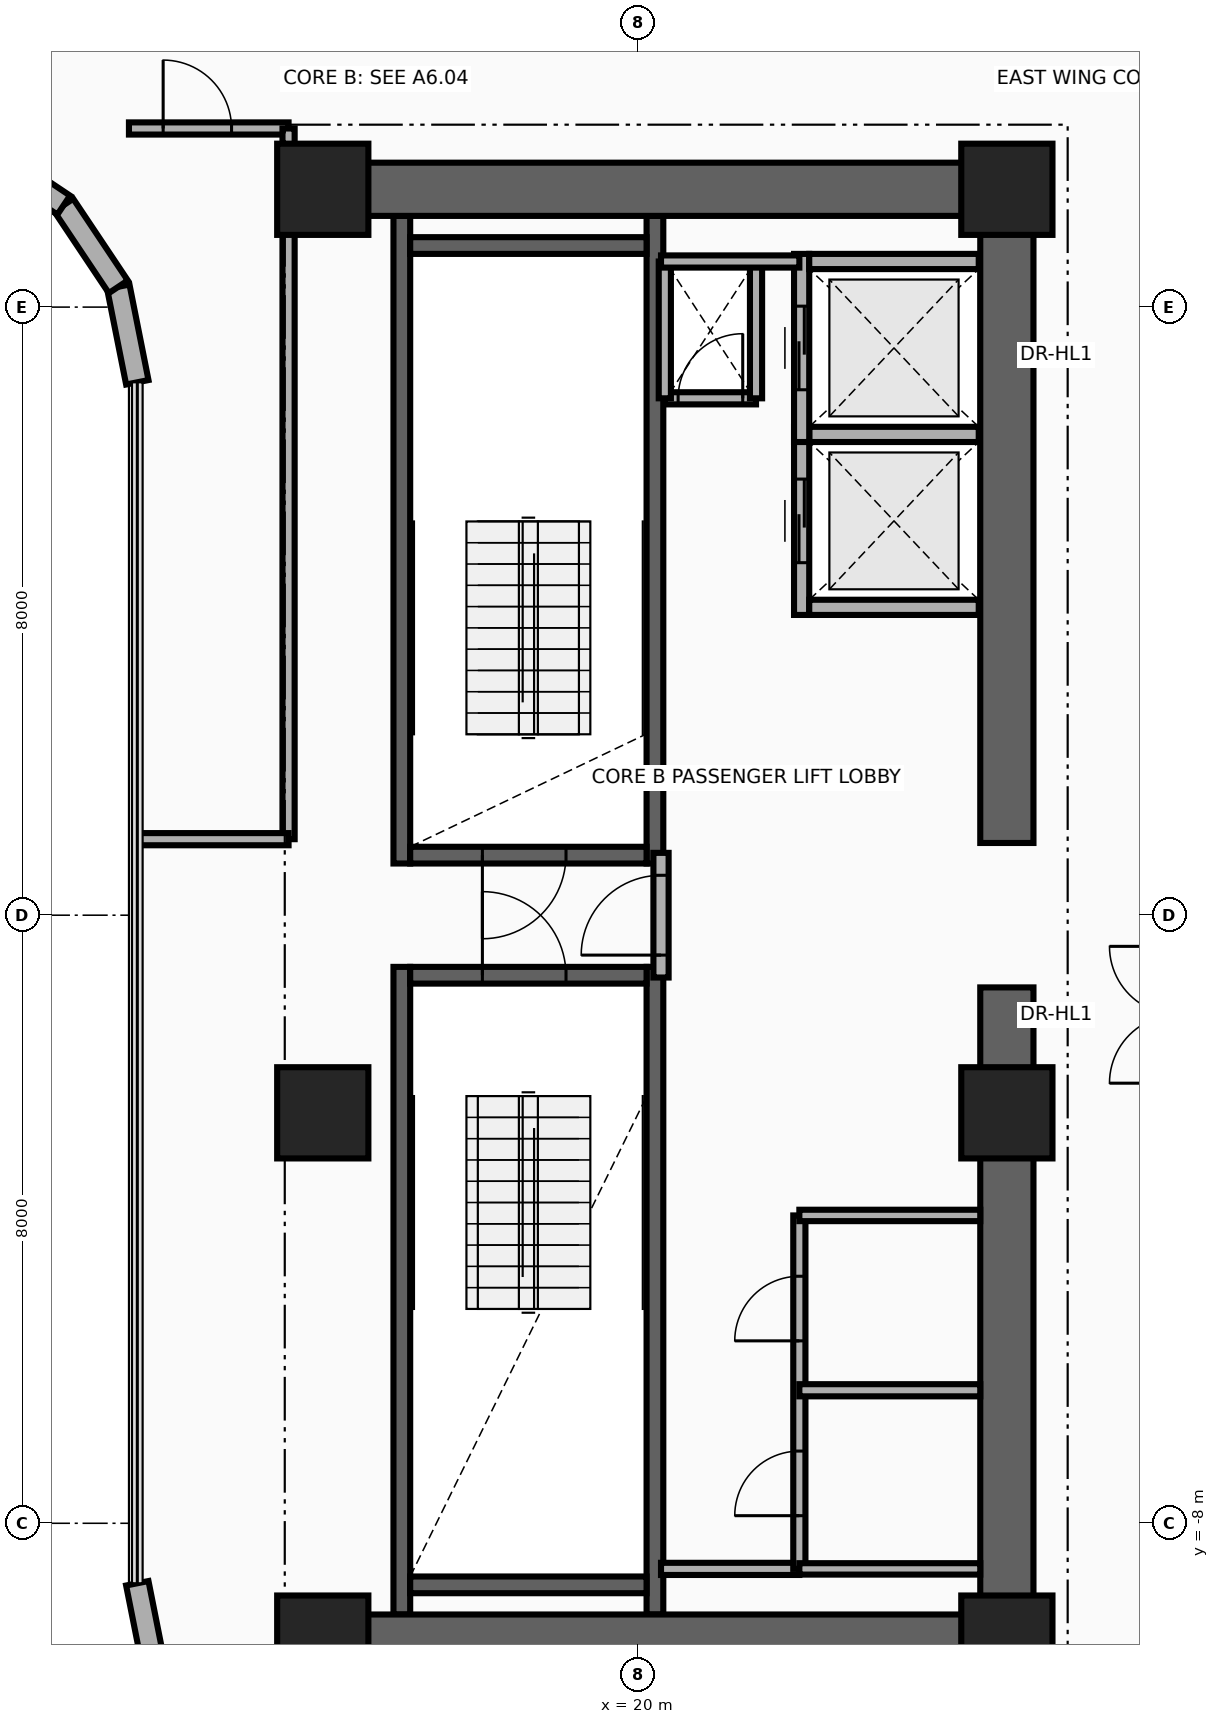
"""IFC4 building model, lengths in metres.
Left out: names, types, materials, properties, quantities, classifications, styles, units other than length and angle.
Written with IfcOpenShell. Run it as: python <this file> out.ifc"""

import sys

from ifc_helpers import new_model, si_unit, direction, frame, frame_2d, origin, origin_2d, place, context, subcontext, project, spatial, rectangle, extrude, source, transform, mapped, element, fill, save


model = new_model("IFC4")
c1 = context("Model", 3, precision=1e-05, world=origin(), true_north=direction((0.0, 1.0)))
c2 = subcontext(c1, "Body", "Model", "MODEL_VIEW")
j1 = project(units=[si_unit("LENGTHUNIT", "METRE"), si_unit("PLANEANGLEUNIT", "RADIAN")], contexts=[c1])
p1 = place(None, origin())
s1 = spatial("IfcSite", under=j1, at=p1, CompositionType="ELEMENT")
p2 = place(p1, origin())
s2 = spatial("IfcBuilding", under=s1, at=p2, CompositionType="ELEMENT")
p3 = place(p2, frame((0.0, 0.0, 109.4)))
s3 = spatial("IfcBuildingStorey", under=s2, at=p3, CompositionType="ELEMENT", Elevation=109.4)
for number, where, z_axis, x_axis in (
    (1, (16.89, 0.68, 0.0), (0.0, 0.0, 1.0), (0.0, 1.0, 0.0)),
    (2, (20.22, 0.68, 0.0), (0.0, 0.0, 1.0), (0.0, 1.0, 0.0)),
):
    element("IfcWall", number, at=place(p3, frame(where, z_axis=z_axis, x_axis=x_axis)), inside=s3, PredefinedType="SHEAR", context=c2, shape_type="SweptSolid", body=[
        extrude(rectangle(XDim=8.52, YDim=0.22, at=frame_2d((4.26, 0.0))), origin(), (0.0, 0.0, 1.0), 3.46),
    ])
p4 = place(p3, frame((17.0, 0.79, 0.0), z_axis=(0.0, 0.0, 1.0), x_axis=(1.0, 0.0, 0.0)))
e3 = element("IfcWall", 3, at=p4, inside=s3, PredefinedType="SHEAR", context=c2, shape_type="SweptSolid", body=[
    extrude(rectangle(XDim=3.11, YDim=0.22, at=frame_2d((1.555, 0.0))), origin(), (0.0, 0.0, 1.0), 3.46),
])
p5 = place(p4, frame((0.95, 0.0, 0.0)))
e4 = element("IfcOpeningElement", 4, at=p5, cuts=e3, PredefinedType="OPENING", context=c2, shape_type="SweptSolid", body=[
    extrude(rectangle(XDim=1.1, YDim=2.15, at=frame_2d((0.55, 1.075))), frame((0.0, 0.125, 0.0), z_axis=(0.0, -1.0, 0.0), x_axis=(1.0, 0.0, 0.0)), (0.0, 0.0, 1.0), 0.25),
])
p6 = place(p3, frame((17.0, 8.81, 0.0), z_axis=(0.0, 0.0, 1.0), x_axis=(1.0, 0.0, 0.0)))
e5 = element("IfcWall", 5, at=p6, inside=s3, PredefinedType="SHEAR", context=c2, shape_type="SweptSolid", body=[
    extrude(rectangle(XDim=3.11, YDim=0.22, at=frame_2d((1.555, 0.0))), origin(), (0.0, 0.0, 1.0), 3.46),
])
for number, where, z_axis, x_axis in (
    (6, (16.89, -9.2, 0.0), (0.0, 0.0, 1.0), (0.0, 1.0, 0.0)),
    (7, (20.22, -9.2, 0.0), (0.0, 0.0, 1.0), (0.0, 1.0, 0.0)),
):
    element("IfcWall", number, at=place(p3, frame(where, z_axis=z_axis, x_axis=x_axis)), inside=s3, PredefinedType="SHEAR", context=c2, shape_type="SweptSolid", body=[
        extrude(rectangle(XDim=8.52, YDim=0.22, at=frame_2d((4.26, 0.0))), origin(), (0.0, 0.0, 1.0), 3.46),
    ])
p7 = place(p3, frame((17.0, -8.81, 0.0), z_axis=(0.0, 0.0, 1.0), x_axis=(1.0, 0.0, 0.0)))
e8 = element("IfcWall", 8, at=p7, inside=s3, PredefinedType="SHEAR", context=c2, shape_type="SweptSolid", body=[
    extrude(rectangle(XDim=3.11, YDim=0.22, at=frame_2d((1.555, 0.0))), origin(), (0.0, 0.0, 1.0), 3.46),
])
p8 = place(p3, frame((17.0, -0.79, 0.0), z_axis=(0.0, 0.0, 1.0), x_axis=(1.0, 0.0, 0.0)))
e9 = element("IfcWall", 9, at=p8, inside=s3, PredefinedType="SHEAR", context=c2, shape_type="SweptSolid", body=[
    extrude(rectangle(XDim=3.11, YDim=0.22, at=frame_2d((1.555, 0.0))), origin(), (0.0, 0.0, 1.0), 3.46),
])
p9 = place(p8, frame((0.95, 0.0, 0.0)))
e10 = element("IfcOpeningElement", 10, at=p9, cuts=e9, PredefinedType="OPENING", context=c2, shape_type="SweptSolid", body=[
    extrude(rectangle(XDim=1.1, YDim=2.15, at=frame_2d((0.55, 1.075))), frame((0.0, 0.125, 0.0), z_axis=(0.0, -1.0, 0.0), x_axis=(1.0, 0.0, 0.0)), (0.0, 0.0, 1.0), 0.25),
])
for number, where, z_axis, x_axis in (
    (11, (24.85, -9.9, 0.0), (0.0, 0.0, 1.0), (0.0, 1.0, 0.0)),
    (12, (24.85, 0.95, 0.0), (0.0, 0.0, 1.0), (0.0, 1.0, 0.0)),
):
    element("IfcWall", number, at=place(p3, frame(where, z_axis=z_axis, x_axis=x_axis)), inside=s3, PredefinedType="SHEAR", context=c2, shape_type="SweptSolid", body=[
        extrude(rectangle(XDim=8.95, YDim=0.7, at=frame_2d((4.475, 0.0))), origin(), (0.0, 0.0, 1.0), 3.46),
    ])
for number, where, z_axis, x_axis in (
    (13, (15.85, 9.55, 0.0), (0.0, 0.0, 1.0), (1.0, 0.0, 0.0)),
    (14, (15.85, -9.55, 0.0), (0.0, 0.0, 1.0), (1.0, 0.0, 0.0)),
):
    element("IfcWall", number, at=place(p3, frame(where, z_axis=z_axis, x_axis=x_axis)), inside=s3, PredefinedType="SHEAR", context=c2, shape_type="SweptSolid", body=[
        extrude(rectangle(XDim=9.0, YDim=0.7, at=frame_2d((4.5, 0.0))), origin(), (0.0, 0.0, 1.0), 3.46),
    ])
m1 = source(origin(), c2, "Body", "SweptSolid", [
    extrude(rectangle(XDim=1.2, YDim=1.2, at=origin_2d()), origin(), (0.0, 0.0, 1.0), 3.7),
])
for number, where, z_axis, x_axis in (
    (15, (15.85, -9.55, 0.0), (0.0, 0.0, 1.0), (1.0, 0.0, 0.0)),
    (16, (24.85, -9.55, 0.0), (0.0, 0.0, 1.0), (1.0, 0.0, 0.0)),
    (17, (15.85, -2.6, 0.0), (0.0, 0.0, 1.0), (1.0, 0.0, 0.0)),
    (18, (24.85, -2.6, 0.0), (0.0, 0.0, 1.0), (1.0, 0.0, 0.0)),
    (19, (15.85, 9.55, 0.0), (0.0, 0.0, 1.0), (1.0, 0.0, 0.0)),
    (20, (24.85, 9.55, 0.0), (0.0, 0.0, 1.0), (1.0, 0.0, 0.0)),
):
    element("IfcColumn", number, at=place(p3, frame(where, z_axis=z_axis, x_axis=x_axis)), inside=s3, PredefinedType="COLUMN", context=c2, shape_type="MappedRepresentation", body=[
        mapped(m1, transform((0.0, 0.0, 0.0), x_axis=(1.0, 0.0, 0.0), y_axis=(0.0, 1.0, 0.0), z_axis=(0.0, 0.0, 1.0), scale=1.0)),
    ])
p10 = place(p3, frame((13.647, -9.982, 0.0), z_axis=(0.0, 0.0, 1.0), x_axis=(-0.195189223115, 0.980765602568, 0.0)))
e21 = element("IfcWall", 21, at=p10, inside=s3, PredefinedType="SOLIDWALL", context=c2, shape_type="SweptSolid", body=[
    extrude(rectangle(XDim=1.216, YDim=0.3, at=frame_2d((0.608, 0.0))), origin(), (0.0, 0.0, 1.0), 3.46),
])
p11 = place(p3, frame((13.41, 7.011, 0.0), z_axis=(0.0, 0.0, 1.0), x_axis=(-0.195090163074, 0.980785312019, 0.0)))
e22 = element("IfcWall", 22, at=p11, inside=s3, PredefinedType="SOLIDWALL", context=c2, shape_type="SweptSolid", body=[
    extrude(rectangle(XDim=1.281, YDim=0.3, at=frame_2d((0.641, 0.0))), origin(), (0.0, 0.0, 1.0), 3.46),
])
for number, where, z_axis, x_axis in (
    (23, (13.16, 8.268, 0.0), (0.0, 0.0, 1.0), (-0.556, 0.831, 0.0)),
    (24, (12.442, 9.342, 0.0), (0.0, 0.0, 1.0), (-0.831, 0.556, 0.0)),
):
    element("IfcWall", number, at=place(p3, frame(where, z_axis=z_axis, x_axis=x_axis)), inside=s3, PredefinedType="SOLIDWALL", context=c2, shape_type="SweptSolid", body=[
        extrude(rectangle(XDim=1.292, YDim=0.3, at=frame_2d((0.646, 0.0))), origin(), (0.0, 0.0, 1.0), 3.46),
    ])
p12 = place(p3, frame((22.15, 3.95, 0.0), z_axis=(0.0, 0.0, 1.0), x_axis=(0.0, 1.0, 0.0)))
e25 = element("IfcWall", 25, at=p12, inside=s3, PredefinedType="MOVABLE", context=c2, shape_type="SweptSolid", body=[
    extrude(rectangle(XDim=2.475, YDim=0.2, at=frame_2d((1.238, 0.0))), origin(), (0.0, 0.0, 1.0), 3.46),
])
p13 = place(p12, frame((0.688, 0.0, 0.0)))
e26 = element("IfcOpeningElement", 26, at=p13, cuts=e25, PredefinedType="OPENING", context=c2, shape_type="SweptSolid", body=[
    extrude(rectangle(XDim=1.1, YDim=2.1, at=frame_2d((0.55, 1.05))), frame((0.0, 0.115, 0.0), z_axis=(0.0, -1.0, 0.0), x_axis=(1.0, 0.0, 0.0)), (0.0, 0.0, 1.0), 0.23),
])
for number, where, z_axis, x_axis in (
    (27, (22.25, 4.05, 0.0), (0.0, 0.0, 1.0), (1.0, 0.0, 0.0)),
    (28, (22.25, 6.325, 0.0), (0.0, 0.0, 1.0), (1.0, 0.0, 0.0)),
):
    element("IfcWall", number, at=place(p3, frame(where, z_axis=z_axis, x_axis=x_axis)), inside=s3, PredefinedType="MOVABLE", context=c2, shape_type="SweptSolid", body=[
        extrude(rectangle(XDim=2.23, YDim=0.2, at=frame_2d((1.115, 0.0))), origin(), (0.0, 0.0, 1.0), 2.245),
    ])
p14 = place(p3, frame((22.15, 6.225, 0.0), z_axis=(0.0, 0.0, 1.0), x_axis=(0.0, 1.0, 0.0)))
e29 = element("IfcWall", 29, at=p14, inside=s3, PredefinedType="MOVABLE", context=c2, shape_type="SweptSolid", body=[
    extrude(rectangle(XDim=2.475, YDim=0.2, at=frame_2d((1.237, 0.0))), origin(), (0.0, 0.0, 1.0), 3.46),
])
p15 = place(p14, frame((0.688, 0.0, 0.0)))
e30 = element("IfcOpeningElement", 30, at=p15, cuts=e29, PredefinedType="OPENING", context=c2, shape_type="SweptSolid", body=[
    extrude(rectangle(XDim=1.1, YDim=2.1, at=frame_2d((0.55, 1.05))), frame((0.0, 0.115, 0.0), z_axis=(0.0, -1.0, 0.0), x_axis=(1.0, 0.0, 0.0)), (0.0, 0.0, 1.0), 0.23),
])
p16 = place(p3, frame((22.25, 8.6, 0.0), z_axis=(0.0, 0.0, 1.0), x_axis=(1.0, 0.0, 0.0)))
e31 = element("IfcWall", 31, at=p16, inside=s3, PredefinedType="MOVABLE", context=c2, shape_type="SweptSolid", body=[
    extrude(rectangle(XDim=2.23, YDim=0.2, at=frame_2d((1.115, 0.0))), origin(), (0.0, 0.0, 1.0), 2.245),
])
p17 = place(p3, frame((20.3, -0.82, 0.0), z_axis=(0.0, 0.0, 1.0), x_axis=(0.0, 1.0, 0.0)))
e32 = element("IfcWall", 32, at=p17, inside=s3, PredefinedType="PARTITIONING", context=c2, shape_type="SweptSolid", body=[
    extrude(rectangle(XDim=1.64, YDim=0.2, at=frame_2d((0.82, 0.0))), origin(), (0.0, 0.0, 1.0), 3.46),
])
p18 = place(p17, frame((0.295, 0.0, 0.0)))
e33 = element("IfcOpeningElement", 33, at=p18, cuts=e32, PredefinedType="OPENING", context=c2, shape_type="SweptSolid", body=[
    extrude(rectangle(XDim=1.05, YDim=2.15, at=frame_2d((0.525, 1.075))), frame((0.0, 0.115, 0.0), z_axis=(0.0, -1.0, 0.0), x_axis=(1.0, 0.0, 0.0)), (0.0, 0.0, 1.0), 0.23),
])
p19 = place(p3, frame((20.35, 6.8, 0.0), z_axis=(0.0, 0.0, 1.0), x_axis=(1.0, 0.0, 0.0)))
e34 = element("IfcWall", 34, at=p19, inside=s3, PredefinedType="PARTITIONING", context=c2, shape_type="SweptSolid", body=[
    extrude(rectangle(XDim=1.2, YDim=0.16, at=frame_2d((0.6, 0.0))), origin(), (0.0, 0.0, 1.0), 3.46),
])
p20 = place(p19, frame((0.175, 0.0, 0.0)))
e35 = element("IfcOpeningElement", 35, at=p20, cuts=e34, PredefinedType="OPENING", context=c2, shape_type="SweptSolid", body=[
    extrude(rectangle(XDim=0.85, YDim=2.05, at=frame_2d((0.425, 1.025))), frame((0.0, 0.095, 0.0), z_axis=(0.0, -1.0, 0.0), x_axis=(1.0, 0.0, 0.0)), (0.0, 0.0, 1.0), 0.19),
])
for number, where, z_axis, x_axis in (
    (36, (21.55, 6.8, 0.0), (0.0, 0.0, 1.0), (0.0, 1.0, 0.0)),
    (37, (20.35, 6.8, 0.0), (0.0, 0.0, 1.0), (0.0, 1.0, 0.0)),
):
    element("IfcWall", number, at=place(p3, frame(where, z_axis=z_axis, x_axis=x_axis)), inside=s3, PredefinedType="PARTITIONING", context=c2, shape_type="SweptSolid", body=[
        extrude(rectangle(XDim=1.8, YDim=0.16, at=frame_2d((0.9, 0.0))), origin(), (0.0, 0.0, 1.0), 3.46),
    ])
for number, where, z_axis, x_axis in (
    (38, (20.3, -8.6, 0.0), (0.0, 0.0, 1.0), (1.0, 0.0, 0.0)),
    (39, (20.3, 8.6, 0.0), (0.0, 0.0, 1.0), (1.0, 0.0, 0.0)),
):
    element("IfcWall", number, at=place(p3, frame(where, z_axis=z_axis, x_axis=x_axis)), inside=s3, PredefinedType="PARTITIONING", context=c2, shape_type="SweptSolid", body=[
        extrude(rectangle(XDim=1.82, YDim=0.16, at=frame_2d((0.91, 0.0))), origin(), (0.0, 0.0, 1.0), 3.46),
    ])
p21 = place(p3, frame((22.12, -8.6, 0.0), z_axis=(0.0, 0.0, 1.0), x_axis=(0.0, 1.0, 0.0)))
e40 = element("IfcWall", 40, at=p21, inside=s3, PredefinedType="PARTITIONING", context=c2, shape_type="SweptSolid", body=[
    extrude(rectangle(XDim=4.65, YDim=0.16, at=frame_2d((2.325, 0.0))), origin(), (0.0, 0.0, 1.0), 3.46),
])
p22 = place(p21, frame((0.7, 0.0, 0.0)))
e41 = element("IfcOpeningElement", 41, at=p22, cuts=e40, PredefinedType="OPENING", context=c2, shape_type="SweptSolid", body=[
    extrude(rectangle(XDim=0.85, YDim=2.05, at=frame_2d((0.425, 1.025))), frame((0.0, 0.095, 0.0), z_axis=(0.0, -1.0, 0.0), x_axis=(1.0, 0.0, 0.0)), (0.0, 0.0, 1.0), 0.19),
])
p23 = place(p21, frame((3.0, 0.0, 0.0)))
e42 = element("IfcOpeningElement", 42, at=p23, cuts=e40, PredefinedType="OPENING", context=c2, shape_type="SweptSolid", body=[
    extrude(rectangle(XDim=0.85, YDim=2.05, at=frame_2d((0.425, 1.025))), frame((0.0, 0.095, 0.0), z_axis=(0.0, -1.0, 0.0), x_axis=(1.0, 0.0, 0.0)), (0.0, 0.0, 1.0), 0.19),
])
for number, where, z_axis, x_axis in (
    (43, (22.12, -3.95, 0.0), (0.0, 0.0, 1.0), (1.0, 0.0, 0.0)),
    (44, (22.12, -8.6, 0.0), (0.0, 0.0, 1.0), (1.0, 0.0, 0.0)),
):
    element("IfcWall", number, at=place(p3, frame(where, z_axis=z_axis, x_axis=x_axis)), inside=s3, PredefinedType="PARTITIONING", context=c2, shape_type="SweptSolid", body=[
        extrude(rectangle(XDim=2.38, YDim=0.15, at=frame_2d((1.19, 0.0))), origin(), (0.0, 0.0, 1.0), 3.46),
    ])
p24 = place(p3, frame((22.12, -6.25, 0.0), z_axis=(0.0, 0.0, 1.0), x_axis=(1.0, 0.0, 0.0)))
e45 = element("IfcWall", 45, at=p24, inside=s3, PredefinedType="PARTITIONING", context=c2, shape_type="SweptSolid", body=[
    extrude(rectangle(XDim=2.38, YDim=0.16, at=frame_2d((1.19, 0.0))), origin(), (0.0, 0.0, 1.0), 3.46),
])
p25 = place(p3, frame((13.3, 10.35, 0.0), z_axis=(0.0, 0.0, 1.0), x_axis=(1.0, 0.0, 0.0)))
e46 = element("IfcWall", 46, at=p25, inside=s3, PredefinedType="PARTITIONING", context=c2, shape_type="SweptSolid", body=[
    extrude(rectangle(XDim=2.1, YDim=0.16, at=frame_2d((1.05, 0.0))), origin(), (0.0, 0.0, 1.0), 2.666),
])
p26 = place(p25, frame((0.45, 0.0, 0.0)))
e47 = element("IfcOpeningElement", 47, at=p26, cuts=e46, PredefinedType="OPENING", context=c2, shape_type="SweptSolid", body=[
    extrude(rectangle(XDim=0.9, YDim=2.1, at=frame_2d((0.45, 1.05))), frame((0.0, 0.095, 0.0), z_axis=(0.0, -1.0, 0.0), x_axis=(1.0, 0.0, 0.0)), (0.0, 0.0, 1.0), 0.19),
])
p27 = place(p3, frame((15.4, 1.0, 0.0), z_axis=(0.0, 0.0, 1.0), x_axis=(0.0, 1.0, 0.0)))
e48 = element("IfcWall", 48, at=p27, inside=s3, PredefinedType="PARTITIONING", context=c2, shape_type="SweptSolid", body=[
    extrude(rectangle(XDim=9.35, YDim=0.16, at=frame_2d((4.675, 0.0))), origin(), (0.0, 0.0, 1.0), 2.245),
])
p28 = place(p3, frame((13.41, 1.0, 0.0), z_axis=(0.0, 0.0, 1.0), x_axis=(1.0, 0.0, 0.0)))
e49 = element("IfcWall", 49, at=p28, inside=s3, PredefinedType="PARTITIONING", context=c2, shape_type="SweptSolid", body=[
    extrude(rectangle(XDim=1.99, YDim=0.16, at=frame_2d((0.995, 0.0))), origin(), (0.0, 0.0, 1.0), 2.245),
])
p29 = place(p13, origin())
e50 = element("IfcDoor", 50, at=p29, inside=s3, OperationType="DOUBLE_DOOR_SLIDING", PredefinedType="DOOR", context=c2, shape_type="SweptSolid", body=[
    extrude(rectangle(XDim=1.1, YDim=2.1, at=frame_2d((0.55, 1.05))), frame((0.0, 0.025, 0.0), z_axis=(0.0, -1.0, 0.0), x_axis=(1.0, 0.0, 0.0)), (0.0, 0.0, 1.0), 0.05),
])
fill(e26, e50)
p30 = place(p15, origin())
e51 = element("IfcDoor", 51, at=p30, inside=s3, OperationType="DOUBLE_DOOR_SLIDING", PredefinedType="DOOR", context=c2, shape_type="SweptSolid", body=[
    extrude(rectangle(XDim=1.1, YDim=2.1, at=frame_2d((0.55, 1.05))), frame((0.0, 0.025, 0.0), z_axis=(0.0, -1.0, 0.0), x_axis=(1.0, 0.0, 0.0)), (0.0, 0.0, 1.0), 0.05),
])
fill(e30, e51)
p31 = place(p18, origin())
e52 = element("IfcDoor", 52, at=p31, inside=s3, OperationType="SINGLE_SWING_RIGHT", PredefinedType="DOOR", context=c2, shape_type="SweptSolid", body=[
    extrude(rectangle(XDim=1.05, YDim=2.15, at=frame_2d((0.525, 1.075))), frame((0.0, 0.025, 0.0), z_axis=(0.0, -1.0, 0.0), x_axis=(1.0, 0.0, 0.0)), (0.0, 0.0, 1.0), 0.05),
])
fill(e33, e52)
p32 = place(p5, frame((1.1, 0.0, 0.0), z_axis=(0.0, 0.0, 1.0), x_axis=(-1.0, 0.0, 0.0)))
e53 = element("IfcDoor", 53, at=p32, inside=s3, OperationType="SINGLE_SWING_LEFT", PredefinedType="DOOR", context=c2, shape_type="SweptSolid", body=[
    extrude(rectangle(XDim=1.1, YDim=2.15, at=frame_2d((0.55, 1.075))), frame((0.0, 0.025, 0.0), z_axis=(0.0, -1.0, 0.0), x_axis=(1.0, 0.0, 0.0)), (0.0, 0.0, 1.0), 0.05),
])
fill(e4, e53)
p33 = place(p9, origin())
e54 = element("IfcDoor", 54, at=p33, inside=s3, OperationType="SINGLE_SWING_RIGHT", PredefinedType="DOOR", context=c2, shape_type="SweptSolid", body=[
    extrude(rectangle(XDim=1.1, YDim=2.15, at=frame_2d((0.55, 1.075))), frame((0.0, 0.025, 0.0), z_axis=(0.0, -1.0, 0.0), x_axis=(1.0, 0.0, 0.0)), (0.0, 0.0, 1.0), 0.05),
])
fill(e10, e54)
p34 = place(p20, origin())
e55 = element("IfcDoor", 55, at=p34, inside=s3, OperationType="SINGLE_SWING_LEFT", PredefinedType="DOOR", context=c2, shape_type="SweptSolid", body=[
    extrude(rectangle(XDim=0.85, YDim=2.05, at=frame_2d((0.425, 1.025))), frame((0.0, 0.025, 0.0), z_axis=(0.0, -1.0, 0.0), x_axis=(1.0, 0.0, 0.0)), (0.0, 0.0, 1.0), 0.05),
])
fill(e35, e55)
p35 = place(p22, origin())
e56 = element("IfcDoor", 56, at=p35, inside=s3, OperationType="SINGLE_SWING_RIGHT", PredefinedType="DOOR", context=c2, shape_type="SweptSolid", body=[
    extrude(rectangle(XDim=0.85, YDim=2.05, at=frame_2d((0.425, 1.025))), frame((0.0, 0.025, 0.0), z_axis=(0.0, -1.0, 0.0), x_axis=(1.0, 0.0, 0.0)), (0.0, 0.0, 1.0), 0.05),
])
fill(e41, e56)
p36 = place(p23, origin())
e57 = element("IfcDoor", 57, at=p36, inside=s3, OperationType="SINGLE_SWING_LEFT", PredefinedType="DOOR", context=c2, shape_type="SweptSolid", body=[
    extrude(rectangle(XDim=0.85, YDim=2.05, at=frame_2d((0.425, 1.025))), frame((0.0, 0.025, 0.0), z_axis=(0.0, -1.0, 0.0), x_axis=(1.0, 0.0, 0.0)), (0.0, 0.0, 1.0), 0.05),
])
fill(e42, e57)
p37 = place(p26, origin())
e58 = element("IfcDoor", 58, at=p37, inside=s3, OperationType="SINGLE_SWING_RIGHT", PredefinedType="DOOR", context=c2, shape_type="SweptSolid", body=[
    extrude(rectangle(XDim=0.9, YDim=2.1, at=frame_2d((0.45, 1.05))), frame((0.0, 0.025, 0.0), z_axis=(0.0, -1.0, 0.0), x_axis=(1.0, 0.0, 0.0)), (0.0, 0.0, 1.0), 0.05),
])
fill(e47, e58)
save(model, sys.argv[1])
